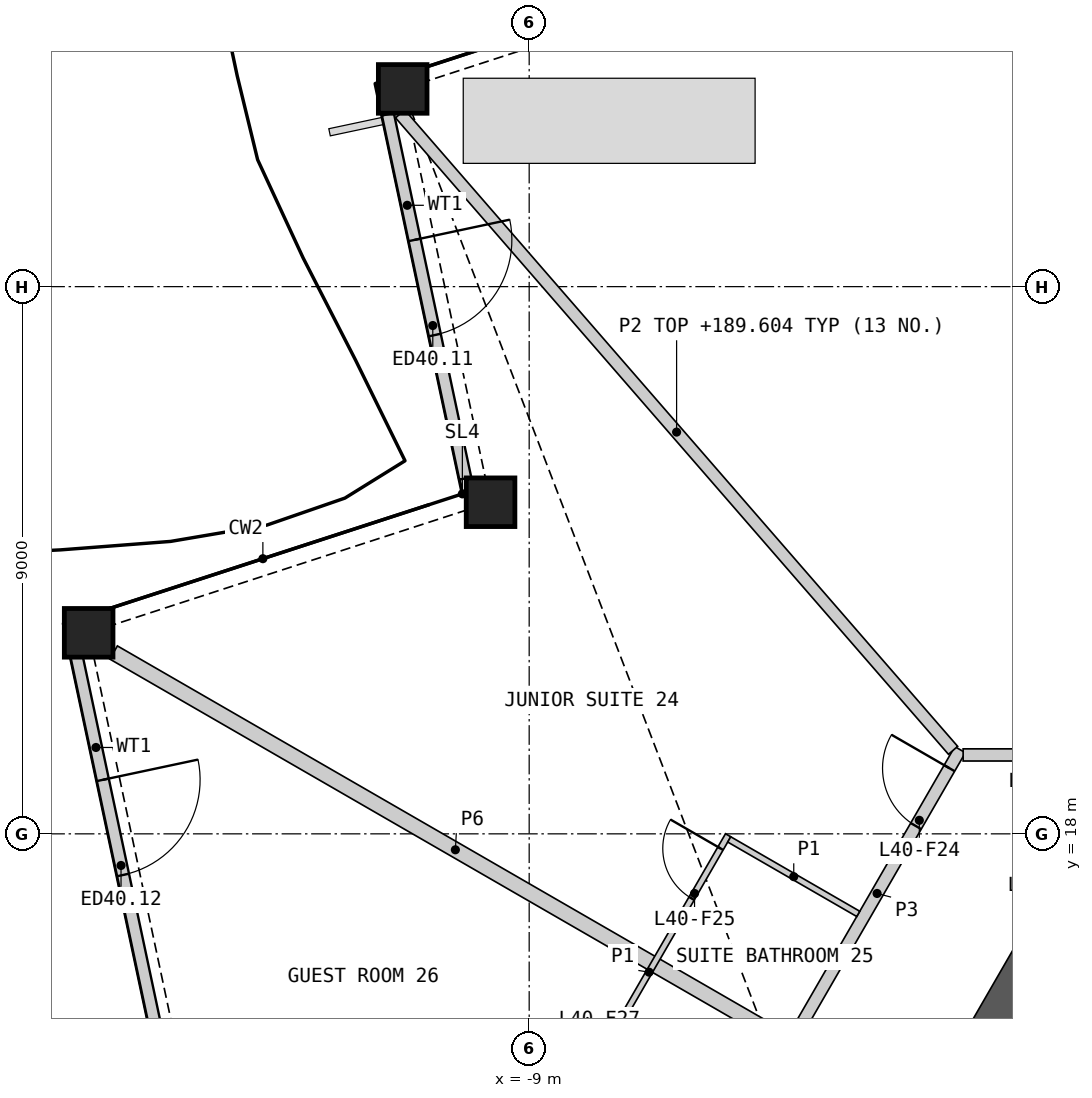
"""IFC4 building model, lengths in metres.
Left out: names, types, materials, properties, quantities, classifications, styles, units other than length and angle.
Written with IfcOpenShell. Run it as: python <this file> out.ifc"""

import sys

from ifc_helpers import new_model, si_unit, direction, frame, frame_2d, origin, origin_2d, place, context, subcontext, project, spatial, rectangle, hollow_rectangle, extrude, element, fill, save


model = new_model("IFC4")
c1 = context("Model", 3, precision=1e-05, world=origin(), true_north=direction((0.0, 1.0)))
c2 = subcontext(c1, "Body", "Model", "MODEL_VIEW")
j1 = project(units=[si_unit("LENGTHUNIT", "METRE"), si_unit("PLANEANGLEUNIT", "RADIAN")], contexts=[c1])
p1 = place(None, origin())
s1 = spatial("IfcSite", under=j1, at=p1, CompositionType="ELEMENT")
p2 = place(p1, origin())
s2 = spatial("IfcBuilding", under=s1, at=p2, CompositionType="ELEMENT")
p3 = place(p2, frame((0.0, 0.0, 187.2)))
s3 = spatial("IfcBuildingStorey", under=s2, at=p3, CompositionType="ELEMENT", Elevation=187.2)
for number, where, z_axis, x_axis in (
    (1, (-11.08, 30.252, 0.0), (0.0, 0.0, 1.0), (1.0, 0.0, 0.0)),
    (2, (-9.635, 23.454, 0.0), (0.0, 0.0, 1.0), (1.0, 0.0, 0.0)),
    (3, (-16.245, 21.306, 0.0), (0.0, 0.0, 1.0), (1.0, 0.0, 0.0)),
):
    element("IfcColumn", number, at=place(p3, frame(where, z_axis=z_axis, x_axis=x_axis)), inside=s3, PredefinedType="COLUMN", context=c2, shape_type="SweptSolid", body=[
        extrude(hollow_rectangle(XDim=0.8, YDim=0.8, WallThickness=0.05, at=origin_2d()), origin(), (0.0, 0.0, 1.0), 3.6),
    ])
p4 = place(p3, frame((-11.324, 29.835, 0.0), z_axis=(0.0, 0.0, 1.0), x_axis=(0.207925037413, -0.978144763732, 0.0)))
e4 = element("IfcWall", 4, at=p4, inside=s3, PredefinedType="SOLIDWALL", context=c2, shape_type="SweptSolid", body=[
    extrude(rectangle(XDim=6.123, YDim=0.2, at=frame_2d((3.062, 0.0))), origin(), (0.0, 0.0, 1.0), 2.701),
])
p5 = place(p4, frame((2.113, 0.0, 0.0)))
e5 = element("IfcOpeningElement", 5, at=p5, cuts=e4, PredefinedType="OPENING", context=c2, shape_type="SweptSolid", body=[
    extrude(rectangle(XDim=1.6, YDim=2.4, at=frame_2d((0.8, 1.2))), frame((0.0, 0.11, 0.0), z_axis=(0.0, -1.0, 0.0), x_axis=(1.0, 0.0, 0.0)), (0.0, 0.0, 1.0), 0.22),
])
p6 = place(p3, frame((-16.445, 20.925, 0.0), z_axis=(0.0, 0.0, 1.0), x_axis=(0.20791050027, -0.978147853792, 0.0)))
e6 = element("IfcWall", 6, at=p6, inside=s3, PredefinedType="SOLIDWALL", context=c2, shape_type="SweptSolid", body=[
    extrude(rectangle(XDim=6.151, YDim=0.2, at=frame_2d((3.075, 0.0))), origin(), (0.0, 0.0, 1.0), 2.701),
])
p7 = place(p6, frame((2.082, 0.0, 0.0)))
e7 = element("IfcOpeningElement", 7, at=p7, cuts=e6, PredefinedType="OPENING", context=c2, shape_type="SweptSolid", body=[
    extrude(rectangle(XDim=1.6, YDim=2.4, at=frame_2d((0.8, 1.2))), frame((0.0, 0.11, 0.0), z_axis=(0.0, -1.0, 0.0), x_axis=(1.0, 0.0, 0.0)), (0.0, 0.0, 1.0), 0.22),
])
p8 = place(p3, frame((-0.325, 16.585, 0.0), z_axis=(0.0, 0.0, 1.0), x_axis=(-0.500019473932, -0.866014160212, 0.0)))
e8 = element("IfcWall", 8, at=p8, inside=s3, PredefinedType="SHEAR", context=c2, shape_type="SweptSolid", body=[
    extrude(rectangle(XDim=2.396, YDim=0.75, at=frame_2d((1.198, 0.0))), origin(), (0.0, 0.0, 1.0), 3.25),
])
p9 = place(p3, frame((-15.835, 20.983, 0.0), z_axis=(0.0, 0.0, 1.0), x_axis=(0.866022720283, -0.500004647933, 0.0)))
e9 = element("IfcWall", 9, at=p9, inside=s3, PredefinedType="PARTITIONING", context=c2, shape_type="SweptSolid", body=[
    extrude(rectangle(XDim=12.981, YDim=0.25, at=frame_2d((6.49, 0.0))), origin(), (0.0, 0.0, 1.0), 2.404),
])
p10 = place(p3, frame((-4.644, 14.655, 0.0), z_axis=(0.0, 0.0, 1.0), x_axis=(0.49998041698, 0.866036709751, 0.0)))
e10 = element("IfcWall", 10, at=p10, inside=s3, PredefinedType="PARTITIONING", context=c2, shape_type="SweptSolid", body=[
    extrude(rectangle(XDim=5.462, YDim=0.2, at=frame_2d((2.731, 0.0))), origin(), (0.0, 0.0, 1.0), 3.25),
])
p11 = place(p10, frame((4.01, 0.0, 0.0)))
e11 = element("IfcOpeningElement", 11, at=p11, cuts=e10, PredefinedType="OPENING", context=c2, shape_type="SweptSolid", body=[
    extrude(rectangle(XDim=1.1, YDim=2.1, at=frame_2d((0.55, 1.05))), frame((0.0, 0.11, 0.0), z_axis=(0.0, -1.0, 0.0), x_axis=(1.0, 0.0, 0.0)), (0.0, 0.0, 1.0), 0.22),
])
p12 = place(p3, frame((-1.863, 19.298, 0.0), z_axis=(0.0, 0.0, 1.0), x_axis=(1.0, 0.0, 0.0)))
e12 = element("IfcWall", 12, at=p12, inside=s3, PredefinedType="PARTITIONING", context=c2, shape_type="SweptSolid", body=[
    extrude(rectangle(XDim=3.826, YDim=0.2, at=frame_2d((1.913, 0.0))), origin(), (0.0, 0.0, 1.0), 3.25),
])
p13 = place(p12, frame((0.962, 0.0, 0.0)))
e13 = element("IfcOpeningElement", 13, at=p13, cuts=e12, PredefinedType="OPENING", context=c2, shape_type="SweptSolid", body=[
    extrude(rectangle(XDim=1.8, YDim=2.1, at=frame_2d((0.9, 1.05))), frame((0.0, 0.11, 0.0), z_axis=(0.0, -1.0, 0.0), x_axis=(1.0, 0.0, 0.0)), (0.0, 0.0, 1.0), 0.22),
])
p14 = place(p3, frame((-11.122, 29.842, 0.0), z_axis=(0.0, 0.0, 1.0), x_axis=(0.65579678992, -0.754937461205, 0.0)))
e14 = element("IfcWall", 14, at=p14, inside=s3, PredefinedType="PARTITIONING", context=c2, shape_type="SweptSolid", body=[
    extrude(rectangle(XDim=13.867, YDim=0.2, at=frame_2d((6.933, 0.0))), origin(), (0.0, 0.0, 1.0), 2.404),
])
p15 = place(p3, frame((-8.328, 13.473, 0.0), z_axis=(0.0, 0.0, 1.0), x_axis=(0.499992051641, 0.866029992723, 0.0)))
e15 = element("IfcWall", 15, at=p15, inside=s3, PredefinedType="PARTITIONING", context=c2, shape_type="SweptSolid", body=[
    extrude(rectangle(XDim=5.2, YDim=0.1, at=frame_2d((2.6, 0.0))), origin(), (0.0, 0.0, 1.0), 2.404),
])
p16 = place(p15, frame((4.0, 0.0, 0.0)))
e16 = element("IfcOpeningElement", 16, at=p16, cuts=e15, PredefinedType="OPENING", context=c2, shape_type="SweptSolid", body=[
    extrude(rectangle(XDim=0.95, YDim=2.1, at=frame_2d((0.475, 1.05))), frame((0.0, 0.06, 0.0), z_axis=(0.0, -1.0, 0.0), x_axis=(1.0, 0.0, 0.0)), (0.0, 0.0, 1.0), 0.12),
])
p17 = place(p15, frame((0.25, 0.0, 0.0)))
e17 = element("IfcOpeningElement", 17, at=p17, cuts=e15, PredefinedType="OPENING", context=c2, shape_type="SweptSolid", body=[
    extrude(rectangle(XDim=0.95, YDim=2.1, at=frame_2d((0.475, 1.05))), frame((0.0, 0.06, 0.0), z_axis=(0.0, -1.0, 0.0), x_axis=(1.0, 0.0, 0.0)), (0.0, 0.0, 1.0), 0.12),
])
p18 = place(p3, frame((-5.71, 17.908, 0.0), z_axis=(0.0, 0.0, 1.0), x_axis=(0.866057815567, -0.499943856944, 0.0)))
e18 = element("IfcWall", 18, at=p18, inside=s3, PredefinedType="PARTITIONING", context=c2, shape_type="SweptSolid", body=[
    extrude(rectangle(XDim=2.45, YDim=0.1, at=frame_2d((1.225, 0.0))), origin(), (0.0, 0.0, 1.0), 2.404),
])
p19 = place(p5, origin())
e19 = element("IfcDoor", 19, at=p19, inside=s3, OperationType="DOUBLE_DOOR_SINGLE_SWING", PredefinedType="DOOR", context=c2, shape_type="SweptSolid", body=[
    extrude(rectangle(XDim=1.6, YDim=2.4, at=frame_2d((0.8, 1.2))), frame((0.0, 0.025, 0.0), z_axis=(0.0, -1.0, 0.0), x_axis=(1.0, 0.0, 0.0)), (0.0, 0.0, 1.0), 0.05),
])
fill(e5, e19)
p20 = place(p7, origin())
e20 = element("IfcDoor", 20, at=p20, inside=s3, OperationType="DOUBLE_DOOR_SINGLE_SWING", PredefinedType="DOOR", context=c2, shape_type="SweptSolid", body=[
    extrude(rectangle(XDim=1.6, YDim=2.4, at=frame_2d((0.8, 1.2))), frame((0.0, 0.025, 0.0), z_axis=(0.0, -1.0, 0.0), x_axis=(1.0, 0.0, 0.0)), (0.0, 0.0, 1.0), 0.05),
])
fill(e7, e20)
p21 = place(p11, origin())
e21 = element("IfcDoor", 21, at=p21, inside=s3, OperationType="SINGLE_SWING_RIGHT", PredefinedType="DOOR", context=c2, shape_type="SweptSolid", body=[
    extrude(rectangle(XDim=1.1, YDim=2.1, at=frame_2d((0.55, 1.05))), frame((0.0, 0.025, 0.0), z_axis=(0.0, -1.0, 0.0), x_axis=(1.0, 0.0, 0.0)), (0.0, 0.0, 1.0), 0.05),
])
fill(e11, e21)
p22 = place(p16, origin())
e22 = element("IfcDoor", 22, at=p22, inside=s3, OperationType="SINGLE_SWING_RIGHT", PredefinedType="DOOR", context=c2, shape_type="SweptSolid", body=[
    extrude(rectangle(XDim=0.95, YDim=2.1, at=frame_2d((0.475, 1.05))), frame((0.0, 0.025, 0.0), z_axis=(0.0, -1.0, 0.0), x_axis=(1.0, 0.0, 0.0)), (0.0, 0.0, 1.0), 0.05),
])
fill(e16, e22)
save(model, sys.argv[1])
